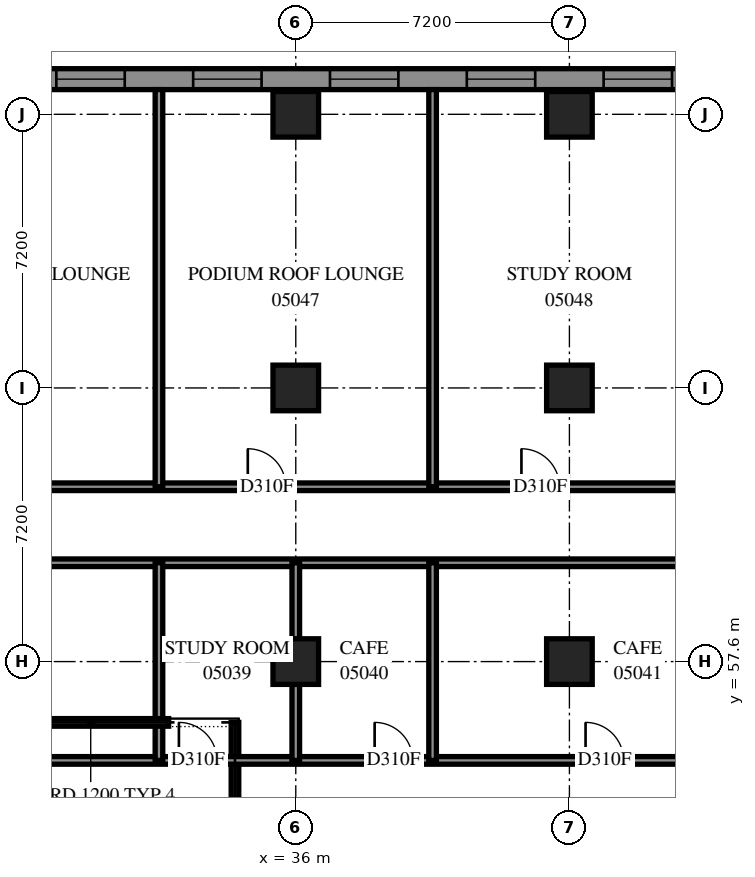
"""IFC4 building model, lengths in metres.
Left out: names, types, materials, properties, quantities, classifications, styles, units other than length and angle.
Written with IfcOpenShell. Run it as: python <this file> out.ifc"""

import sys

from ifc_helpers import new_model, si_unit, direction, frame, frame_2d, origin, origin_2d, place, context, subcontext, project, spatial, polyline, rectangle, outline, extrude, element, fill, save


model = new_model("IFC4")
c1 = context("Model", 3, precision=1e-05, world=origin(), true_north=direction((0.0, 1.0)))
c2 = subcontext(c1, "Body", "Model", "MODEL_VIEW")
j1 = project(units=[si_unit("LENGTHUNIT", "METRE"), si_unit("PLANEANGLEUNIT", "RADIAN")], contexts=[c1])
p1 = place(None, origin())
s1 = spatial("IfcSite", under=j1, at=p1, CompositionType="ELEMENT")
p2 = place(p1, origin())
s2 = spatial("IfcBuilding", under=s1, at=p2, CompositionType="ELEMENT")
p3 = place(p2, frame((0.0, 0.0, 22.8)))
s3 = spatial("IfcBuildingStorey", under=s2, at=p3, CompositionType="ELEMENT", Elevation=22.8)
for number, where, z_axis, x_axis in (
    (1, (36.0, 57.6, 0.0), (0.0, 0.0, 1.0), (1.0, 0.0, 0.0)),
    (2, (36.0, 64.8, 0.0), (0.0, 0.0, 1.0), (1.0, 0.0, 0.0)),
    (3, (36.0, 72.0, 0.0), (0.0, 0.0, 1.0), (1.0, 0.0, 0.0)),
    (4, (43.2, 57.6, 0.0), (0.0, 0.0, 1.0), (1.0, 0.0, 0.0)),
    (5, (43.2, 64.8, 0.0), (0.0, 0.0, 1.0), (1.0, 0.0, 0.0)),
    (6, (43.2, 72.0, 0.0), (0.0, 0.0, 1.0), (1.0, 0.0, 0.0)),
):
    element("IfcColumn", number, at=place(p3, frame(where, z_axis=z_axis, x_axis=x_axis)), inside=s3, PredefinedType="COLUMN", context=c2, shape_type="SweptSolid", body=[
        extrude(rectangle(XDim=1.2, YDim=1.2, at=origin_2d()), origin(), (0.0, 0.0, 1.0), 3.9),
    ])
p4 = place(p3, frame((79.583, 72.925, 0.0), z_axis=(0.0, 0.0, 1.0), x_axis=(-1.0, 0.0, 0.0)))
e7 = element("IfcWall", 7, at=p4, inside=s3, PredefinedType="SOLIDWALL", context=c2, shape_type="SweptSolid", body=[
    extrude(outline(polyline([(-0.114, -0.275), (79.583, -0.275), (79.033, 0.275), (0.114, 0.275), (-0.114, -0.275)])), origin(), (0.0, 0.0, 1.0), 3.9),
])
p5 = place(p4, frame((1.249, 0.0, 0.7)))
e8 = element("IfcOpeningElement", 8, at=p5, cuts=e7, PredefinedType="OPENING", context=c2, shape_type="SweptSolid", body=[
    extrude(rectangle(XDim=1.8, YDim=2.4, at=frame_2d((0.9, 1.2))), frame((0.0, 0.285, 0.0), z_axis=(0.0, -1.0, 0.0), x_axis=(1.0, 0.0, 0.0)), (0.0, 0.0, 1.0), 0.57),
])
p6 = place(p4, frame((4.883, 0.0, 0.7)))
e9 = element("IfcOpeningElement", 9, at=p6, cuts=e7, PredefinedType="OPENING", context=c2, shape_type="SweptSolid", body=[
    extrude(rectangle(XDim=1.8, YDim=2.4, at=frame_2d((0.9, 1.2))), frame((0.0, 0.285, 0.0), z_axis=(0.0, -1.0, 0.0), x_axis=(1.0, 0.0, 0.0)), (0.0, 0.0, 1.0), 0.57),
])
p7 = place(p4, frame((8.483, 0.0, 0.7)))
e10 = element("IfcOpeningElement", 10, at=p7, cuts=e7, PredefinedType="OPENING", context=c2, shape_type="SweptSolid", body=[
    extrude(rectangle(XDim=1.8, YDim=2.4, at=frame_2d((0.9, 1.2))), frame((0.0, 0.285, 0.0), z_axis=(0.0, -1.0, 0.0), x_axis=(1.0, 0.0, 0.0)), (0.0, 0.0, 1.0), 0.57),
])
p8 = place(p4, frame((12.083, 0.0, 0.7)))
e11 = element("IfcOpeningElement", 11, at=p8, cuts=e7, PredefinedType="OPENING", context=c2, shape_type="SweptSolid", body=[
    extrude(rectangle(XDim=1.8, YDim=2.4, at=frame_2d((0.9, 1.2))), frame((0.0, 0.285, 0.0), z_axis=(0.0, -1.0, 0.0), x_axis=(1.0, 0.0, 0.0)), (0.0, 0.0, 1.0), 0.57),
])
p9 = place(p4, frame((15.683, 0.0, 0.7)))
e12 = element("IfcOpeningElement", 12, at=p9, cuts=e7, PredefinedType="OPENING", context=c2, shape_type="SweptSolid", body=[
    extrude(rectangle(XDim=1.8, YDim=2.4, at=frame_2d((0.9, 1.2))), frame((0.0, 0.285, 0.0), z_axis=(0.0, -1.0, 0.0), x_axis=(1.0, 0.0, 0.0)), (0.0, 0.0, 1.0), 0.57),
])
p10 = place(p4, frame((19.283, 0.0, 0.7)))
e13 = element("IfcOpeningElement", 13, at=p10, cuts=e7, PredefinedType="OPENING", context=c2, shape_type="SweptSolid", body=[
    extrude(rectangle(XDim=1.8, YDim=2.4, at=frame_2d((0.9, 1.2))), frame((0.0, 0.285, 0.0), z_axis=(0.0, -1.0, 0.0), x_axis=(1.0, 0.0, 0.0)), (0.0, 0.0, 1.0), 0.57),
])
p11 = place(p4, frame((22.883, 0.0, 0.7)))
e14 = element("IfcOpeningElement", 14, at=p11, cuts=e7, PredefinedType="OPENING", context=c2, shape_type="SweptSolid", body=[
    extrude(rectangle(XDim=1.8, YDim=2.4, at=frame_2d((0.9, 1.2))), frame((0.0, 0.285, 0.0), z_axis=(0.0, -1.0, 0.0), x_axis=(1.0, 0.0, 0.0)), (0.0, 0.0, 1.0), 0.57),
])
p12 = place(p4, frame((26.483, 0.0, 0.7)))
e15 = element("IfcOpeningElement", 15, at=p12, cuts=e7, PredefinedType="OPENING", context=c2, shape_type="SweptSolid", body=[
    extrude(rectangle(XDim=1.8, YDim=2.4, at=frame_2d((0.9, 1.2))), frame((0.0, 0.285, 0.0), z_axis=(0.0, -1.0, 0.0), x_axis=(1.0, 0.0, 0.0)), (0.0, 0.0, 1.0), 0.57),
])
p13 = place(p4, frame((30.083, 0.0, 0.7)))
e16 = element("IfcOpeningElement", 16, at=p13, cuts=e7, PredefinedType="OPENING", context=c2, shape_type="SweptSolid", body=[
    extrude(rectangle(XDim=1.8, YDim=2.4, at=frame_2d((0.9, 1.2))), frame((0.0, 0.285, 0.0), z_axis=(0.0, -1.0, 0.0), x_axis=(1.0, 0.0, 0.0)), (0.0, 0.0, 1.0), 0.57),
])
p14 = place(p4, frame((33.683, 0.0, 0.7)))
e17 = element("IfcOpeningElement", 17, at=p14, cuts=e7, PredefinedType="OPENING", context=c2, shape_type="SweptSolid", body=[
    extrude(rectangle(XDim=1.8, YDim=2.4, at=frame_2d((0.9, 1.2))), frame((0.0, 0.285, 0.0), z_axis=(0.0, -1.0, 0.0), x_axis=(1.0, 0.0, 0.0)), (0.0, 0.0, 1.0), 0.57),
])
p15 = place(p4, frame((37.283, 0.0, 0.7)))
e18 = element("IfcOpeningElement", 18, at=p15, cuts=e7, PredefinedType="OPENING", context=c2, shape_type="SweptSolid", body=[
    extrude(rectangle(XDim=1.8, YDim=2.4, at=frame_2d((0.9, 1.2))), frame((0.0, 0.285, 0.0), z_axis=(0.0, -1.0, 0.0), x_axis=(1.0, 0.0, 0.0)), (0.0, 0.0, 1.0), 0.57),
])
p16 = place(p4, frame((40.883, 0.0, 0.7)))
e19 = element("IfcOpeningElement", 19, at=p16, cuts=e7, PredefinedType="OPENING", context=c2, shape_type="SweptSolid", body=[
    extrude(rectangle(XDim=1.8, YDim=2.4, at=frame_2d((0.9, 1.2))), frame((0.0, 0.285, 0.0), z_axis=(0.0, -1.0, 0.0), x_axis=(1.0, 0.0, 0.0)), (0.0, 0.0, 1.0), 0.57),
])
p17 = place(p4, frame((44.483, 0.0, 0.7)))
e20 = element("IfcOpeningElement", 20, at=p17, cuts=e7, PredefinedType="OPENING", context=c2, shape_type="SweptSolid", body=[
    extrude(rectangle(XDim=1.8, YDim=2.4, at=frame_2d((0.9, 1.2))), frame((0.0, 0.285, 0.0), z_axis=(0.0, -1.0, 0.0), x_axis=(1.0, 0.0, 0.0)), (0.0, 0.0, 1.0), 0.57),
])
p18 = place(p4, frame((48.083, 0.0, 0.7)))
e21 = element("IfcOpeningElement", 21, at=p18, cuts=e7, PredefinedType="OPENING", context=c2, shape_type="SweptSolid", body=[
    extrude(rectangle(XDim=1.8, YDim=2.4, at=frame_2d((0.9, 1.2))), frame((0.0, 0.285, 0.0), z_axis=(0.0, -1.0, 0.0), x_axis=(1.0, 0.0, 0.0)), (0.0, 0.0, 1.0), 0.57),
])
p19 = place(p4, frame((51.683, 0.0, 0.7)))
e22 = element("IfcOpeningElement", 22, at=p19, cuts=e7, PredefinedType="OPENING", context=c2, shape_type="SweptSolid", body=[
    extrude(rectangle(XDim=1.8, YDim=2.4, at=frame_2d((0.9, 1.2))), frame((0.0, 0.285, 0.0), z_axis=(0.0, -1.0, 0.0), x_axis=(1.0, 0.0, 0.0)), (0.0, 0.0, 1.0), 0.57),
])
p20 = place(p4, frame((55.283, 0.0, 0.7)))
e23 = element("IfcOpeningElement", 23, at=p20, cuts=e7, PredefinedType="OPENING", context=c2, shape_type="SweptSolid", body=[
    extrude(rectangle(XDim=1.8, YDim=2.4, at=frame_2d((0.9, 1.2))), frame((0.0, 0.285, 0.0), z_axis=(0.0, -1.0, 0.0), x_axis=(1.0, 0.0, 0.0)), (0.0, 0.0, 1.0), 0.57),
])
p21 = place(p4, frame((58.883, 0.0, 0.7)))
e24 = element("IfcOpeningElement", 24, at=p21, cuts=e7, PredefinedType="OPENING", context=c2, shape_type="SweptSolid", body=[
    extrude(rectangle(XDim=1.8, YDim=2.4, at=frame_2d((0.9, 1.2))), frame((0.0, 0.285, 0.0), z_axis=(0.0, -1.0, 0.0), x_axis=(1.0, 0.0, 0.0)), (0.0, 0.0, 1.0), 0.57),
])
p22 = place(p4, frame((62.483, 0.0, 0.7)))
e25 = element("IfcOpeningElement", 25, at=p22, cuts=e7, PredefinedType="OPENING", context=c2, shape_type="SweptSolid", body=[
    extrude(rectangle(XDim=1.8, YDim=2.4, at=frame_2d((0.9, 1.2))), frame((0.0, 0.285, 0.0), z_axis=(0.0, -1.0, 0.0), x_axis=(1.0, 0.0, 0.0)), (0.0, 0.0, 1.0), 0.57),
])
p23 = place(p4, frame((66.083, 0.0, 0.7)))
e26 = element("IfcOpeningElement", 26, at=p23, cuts=e7, PredefinedType="OPENING", context=c2, shape_type="SweptSolid", body=[
    extrude(rectangle(XDim=1.8, YDim=2.4, at=frame_2d((0.9, 1.2))), frame((0.0, 0.285, 0.0), z_axis=(0.0, -1.0, 0.0), x_axis=(1.0, 0.0, 0.0)), (0.0, 0.0, 1.0), 0.57),
])
p24 = place(p4, frame((69.683, 0.0, 0.7)))
e27 = element("IfcOpeningElement", 27, at=p24, cuts=e7, PredefinedType="OPENING", context=c2, shape_type="SweptSolid", body=[
    extrude(rectangle(XDim=1.8, YDim=2.4, at=frame_2d((0.9, 1.2))), frame((0.0, 0.285, 0.0), z_axis=(0.0, -1.0, 0.0), x_axis=(1.0, 0.0, 0.0)), (0.0, 0.0, 1.0), 0.57),
])
p25 = place(p4, frame((73.683, 0.0, 0.7)))
e28 = element("IfcOpeningElement", 28, at=p25, cuts=e7, PredefinedType="OPENING", context=c2, shape_type="SweptSolid", body=[
    extrude(rectangle(XDim=1.8, YDim=2.4, at=frame_2d((0.9, 1.2))), frame((0.0, 0.285, 0.0), z_axis=(0.0, -1.0, 0.0), x_axis=(1.0, 0.0, 0.0)), (0.0, 0.0, 1.0), 0.57),
])
p26 = place(p4, frame((76.508, 0.0, 0.7)))
e29 = element("IfcOpeningElement", 29, at=p26, cuts=e7, PredefinedType="OPENING", context=c2, shape_type="SweptSolid", body=[
    extrude(rectangle(XDim=1.8, YDim=2.4, at=frame_2d((0.9, 1.2))), frame((0.0, 0.285, 0.0), z_axis=(0.0, -1.0, 0.0), x_axis=(1.0, 0.0, 0.0)), (0.0, 0.0, 1.0), 0.57),
])
p27 = place(p3, frame((34.4, 47.9, 0.0), z_axis=(0.0, 0.0, 1.0), x_axis=(0.0, 1.0, 0.0)))
e30 = element("IfcWall", 30, at=p27, inside=s3, PredefinedType="PARAPET", context=c2, shape_type="SweptSolid", body=[
    extrude(outline(polyline([(0.1, -0.1), (8.2, -0.1), (8.0, 0.1), (-0.1, 0.1), (0.1, -0.1)])), origin(), (0.0, 0.0, 1.0), 0.25),
])
p28 = place(p3, frame((0.0, 55.0, 0.0), z_axis=(0.0, 0.0, 1.0), x_axis=(1.0, 0.0, 0.0)))
e31 = element("IfcWall", 31, at=p28, inside=s3, PredefinedType="PARTITIONING", context=c2, shape_type="SweptSolid", body=[
    extrude(rectangle(XDim=54.6, YDim=0.2, at=frame_2d((27.3, 0.0))), origin(), (0.0, 0.0, 1.0), 3.9),
])
p29 = place(p28, frame((8.689, 0.0, 0.0)))
e32 = element("IfcOpeningElement", 32, at=p29, cuts=e31, PredefinedType="OPENING", context=c2, shape_type="SweptSolid", body=[
    extrude(rectangle(XDim=1.0, YDim=2.1, at=frame_2d((0.5, 1.05))), frame((0.0, 0.11, 0.0), z_axis=(0.0, -1.0, 0.0), x_axis=(1.0, 0.0, 0.0)), (0.0, 0.0, 1.0), 0.22),
])
p30 = place(p28, frame((14.825, 0.0, 0.0)))
e33 = element("IfcOpeningElement", 33, at=p30, cuts=e31, PredefinedType="OPENING", context=c2, shape_type="SweptSolid", body=[
    extrude(rectangle(XDim=1.0, YDim=2.1, at=frame_2d((0.5, 1.05))), frame((0.0, 0.11, 0.0), z_axis=(0.0, -1.0, 0.0), x_axis=(1.0, 0.0, 0.0)), (0.0, 0.0, 1.0), 0.22),
])
p31 = place(p28, frame((27.284, 0.0, 0.0)))
e34 = element("IfcOpeningElement", 34, at=p31, cuts=e31, PredefinedType="OPENING", context=c2, shape_type="SweptSolid", body=[
    extrude(rectangle(XDim=1.0, YDim=2.1, at=frame_2d((0.5, 1.05))), frame((0.0, 0.11, 0.0), z_axis=(0.0, -1.0, 0.0), x_axis=(1.0, 0.0, 0.0)), (0.0, 0.0, 1.0), 0.22),
])
p32 = place(p28, frame((32.925, 0.0, 0.0)))
e35 = element("IfcOpeningElement", 35, at=p32, cuts=e31, PredefinedType="OPENING", context=c2, shape_type="SweptSolid", body=[
    extrude(rectangle(XDim=1.0, YDim=2.1, at=frame_2d((0.5, 1.05))), frame((0.0, 0.11, 0.0), z_axis=(0.0, -1.0, 0.0), x_axis=(1.0, 0.0, 0.0)), (0.0, 0.0, 1.0), 0.22),
])
p33 = place(p28, frame((38.075, 0.0, 0.0)))
e36 = element("IfcOpeningElement", 36, at=p33, cuts=e31, PredefinedType="OPENING", context=c2, shape_type="SweptSolid", body=[
    extrude(rectangle(XDim=1.0, YDim=2.1, at=frame_2d((0.5, 1.05))), frame((0.0, 0.11, 0.0), z_axis=(0.0, -1.0, 0.0), x_axis=(1.0, 0.0, 0.0)), (0.0, 0.0, 1.0), 0.22),
])
p34 = place(p28, frame((43.625, 0.0, 0.0)))
e37 = element("IfcOpeningElement", 37, at=p34, cuts=e31, PredefinedType="OPENING", context=c2, shape_type="SweptSolid", body=[
    extrude(rectangle(XDim=1.0, YDim=2.1, at=frame_2d((0.5, 1.05))), frame((0.0, 0.11, 0.0), z_axis=(0.0, -1.0, 0.0), x_axis=(1.0, 0.0, 0.0)), (0.0, 0.0, 1.0), 0.22),
])
p35 = place(p28, frame((52.752, 0.0, 0.0)))
e38 = element("IfcOpeningElement", 38, at=p35, cuts=e31, PredefinedType="OPENING", context=c2, shape_type="SweptSolid", body=[
    extrude(rectangle(XDim=1.0, YDim=2.1, at=frame_2d((0.5, 1.05))), frame((0.0, 0.11, 0.0), z_axis=(0.0, -1.0, 0.0), x_axis=(1.0, 0.0, 0.0)), (0.0, 0.0, 1.0), 0.22),
])
p36 = place(p28, frame((2.332, 0.0, 0.0)))
e39 = element("IfcOpeningElement", 39, at=p36, cuts=e31, PredefinedType="OPENING", context=c2, shape_type="SweptSolid", body=[
    extrude(rectangle(XDim=1.0, YDim=2.1, at=frame_2d((0.5, 1.05))), frame((0.0, 0.11, 0.0), z_axis=(0.0, -1.0, 0.0), x_axis=(1.0, 0.0, 0.0)), (0.0, 0.0, 1.0), 0.22),
])
p37 = place(p3, frame((0.002, 60.2, 0.0), z_axis=(0.0, 0.0, 1.0), x_axis=(1.0, 0.0, 0.0)))
e40 = element("IfcWall", 40, at=p37, inside=s3, PredefinedType="PARTITIONING", context=c2, shape_type="SweptSolid", body=[
    extrude(rectangle(XDim=54.598, YDim=0.2, at=frame_2d((27.299, 0.0))), origin(), (0.0, 0.0, 1.0), 3.9),
])
p38 = place(p37, frame((3.863, 0.0, 0.0)))
e41 = element("IfcOpeningElement", 41, at=p38, cuts=e40, PredefinedType="OPENING", context=c2, shape_type="SweptSolid", body=[
    extrude(rectangle(XDim=1.0, YDim=2.1, at=frame_2d((0.5, 1.05))), frame((0.0, 0.11, 0.0), z_axis=(0.0, -1.0, 0.0), x_axis=(1.0, 0.0, 0.0)), (0.0, 0.0, 1.0), 0.22),
])
p39 = place(p3, frame((0.002, 62.2, 0.0), z_axis=(0.0, 0.0, 1.0), x_axis=(1.0, 0.0, 0.0)))
e42 = element("IfcWall", 42, at=p39, inside=s3, PredefinedType="PARTITIONING", context=c2, shape_type="SweptSolid", body=[
    extrude(rectangle(XDim=54.598, YDim=0.2, at=frame_2d((27.299, 0.0))), origin(), (0.0, 0.0, 1.0), 3.9),
])
p40 = place(p39, frame((8.667, 0.0, 0.0)))
e43 = element("IfcOpeningElement", 43, at=p40, cuts=e42, PredefinedType="OPENING", context=c2, shape_type="SweptSolid", body=[
    extrude(rectangle(XDim=1.0, YDim=2.1, at=frame_2d((0.5, 1.05))), frame((0.0, 0.11, 0.0), z_axis=(0.0, -1.0, 0.0), x_axis=(1.0, 0.0, 0.0)), (0.0, 0.0, 1.0), 0.22),
])
p41 = place(p39, frame((13.136, 0.0, 0.0)))
e44 = element("IfcOpeningElement", 44, at=p41, cuts=e42, PredefinedType="OPENING", context=c2, shape_type="SweptSolid", body=[
    extrude(rectangle(XDim=1.0, YDim=2.1, at=frame_2d((0.5, 1.05))), frame((0.0, 0.11, 0.0), z_axis=(0.0, -1.0, 0.0), x_axis=(1.0, 0.0, 0.0)), (0.0, 0.0, 1.0), 0.22),
])
p42 = place(p39, frame((20.335, 0.0, 0.0)))
e45 = element("IfcOpeningElement", 45, at=p42, cuts=e42, PredefinedType="OPENING", context=c2, shape_type="SweptSolid", body=[
    extrude(rectangle(XDim=1.0, YDim=2.1, at=frame_2d((0.5, 1.05))), frame((0.0, 0.11, 0.0), z_axis=(0.0, -1.0, 0.0), x_axis=(1.0, 0.0, 0.0)), (0.0, 0.0, 1.0), 0.22),
])
p43 = place(p39, frame((27.535, 0.0, 0.0)))
e46 = element("IfcOpeningElement", 46, at=p43, cuts=e42, PredefinedType="OPENING", context=c2, shape_type="SweptSolid", body=[
    extrude(rectangle(XDim=1.0, YDim=2.1, at=frame_2d((0.5, 1.05))), frame((0.0, 0.11, 0.0), z_axis=(0.0, -1.0, 0.0), x_axis=(1.0, 0.0, 0.0)), (0.0, 0.0, 1.0), 0.22),
])
p44 = place(p39, frame((34.736, 0.0, 0.0)))
e47 = element("IfcOpeningElement", 47, at=p44, cuts=e42, PredefinedType="OPENING", context=c2, shape_type="SweptSolid", body=[
    extrude(rectangle(XDim=1.0, YDim=2.1, at=frame_2d((0.5, 1.05))), frame((0.0, 0.11, 0.0), z_axis=(0.0, -1.0, 0.0), x_axis=(1.0, 0.0, 0.0)), (0.0, 0.0, 1.0), 0.22),
])
p45 = place(p39, frame((41.935, 0.0, 0.0)))
e48 = element("IfcOpeningElement", 48, at=p45, cuts=e42, PredefinedType="OPENING", context=c2, shape_type="SweptSolid", body=[
    extrude(rectangle(XDim=1.0, YDim=2.1, at=frame_2d((0.5, 1.05))), frame((0.0, 0.11, 0.0), z_axis=(0.0, -1.0, 0.0), x_axis=(1.0, 0.0, 0.0)), (0.0, 0.0, 1.0), 0.22),
])
p46 = place(p39, frame((49.136, 0.0, 0.0)))
e49 = element("IfcOpeningElement", 49, at=p46, cuts=e42, PredefinedType="OPENING", context=c2, shape_type="SweptSolid", body=[
    extrude(rectangle(XDim=1.0, YDim=2.1, at=frame_2d((0.5, 1.05))), frame((0.0, 0.11, 0.0), z_axis=(0.0, -1.0, 0.0), x_axis=(1.0, 0.0, 0.0)), (0.0, 0.0, 1.0), 0.22),
])
p47 = place(p39, frame((4.803, 0.0, 0.0)))
e50 = element("IfcOpeningElement", 50, at=p47, cuts=e42, PredefinedType="OPENING", context=c2, shape_type="SweptSolid", body=[
    extrude(rectangle(XDim=1.0, YDim=2.1, at=frame_2d((0.5, 1.05))), frame((0.0, 0.11, 0.0), z_axis=(0.0, -1.0, 0.0), x_axis=(1.0, 0.0, 0.0)), (0.0, 0.0, 1.0), 0.22),
])
for number, where, z_axis, x_axis in (
    (51, (32.4, 62.2, 0.0), (0.0, 0.0, 1.0), (0.0, 1.0, 0.0)),
    (52, (39.6, 62.2, 0.0), (0.0, 0.0, 1.0), (0.0, 1.0, 0.0)),
):
    element("IfcWall", number, at=place(p3, frame(where, z_axis=z_axis, x_axis=x_axis)), inside=s3, PredefinedType="PARTITIONING", context=c2, shape_type="SweptSolid", body=[
        extrude(rectangle(XDim=10.45, YDim=0.2, at=frame_2d((5.225, 0.0))), origin(), (0.0, 0.0, 1.0), 3.9),
    ])
for number, where, z_axis, x_axis in (
    (53, (32.4, 55.0, 0.0), (0.0, 0.0, 1.0), (0.0, 1.0, 0.0)),
    (54, (39.6, 55.0, 0.0), (0.0, 0.0, 1.0), (0.0, 1.0, 0.0)),
):
    element("IfcWall", number, at=place(p3, frame(where, z_axis=z_axis, x_axis=x_axis)), inside=s3, PredefinedType="PARTITIONING", context=c2, shape_type="SweptSolid", body=[
        extrude(rectangle(XDim=5.2, YDim=0.2, at=frame_2d((2.6, 0.0))), origin(), (0.0, 0.0, 1.0), 3.9),
    ])
p48 = place(p3, frame((36.0, 55.0, 0.0), z_axis=(0.0, 0.0, 1.0), x_axis=(0.0, 1.0, 0.0)))
e55 = element("IfcWall", 55, at=p48, inside=s3, PredefinedType="PARTITIONING", context=c2, shape_type="SweptSolid", body=[
    extrude(rectangle(XDim=2.0, YDim=0.2, at=frame_2d((1.0, 0.0))), origin(), (0.0, 0.0, 1.0), 3.4),
])
p49 = place(p3, frame((36.0, 58.2, 0.0), z_axis=(0.0, 0.0, 1.0), x_axis=(0.0, 1.0, 0.0)))
e56 = element("IfcWall", 56, at=p49, inside=s3, PredefinedType="PARTITIONING", context=c2, shape_type="SweptSolid", body=[
    extrude(rectangle(XDim=2.0, YDim=0.2, at=frame_2d((1.0, 0.0))), origin(), (0.0, 0.0, 1.0), 3.9),
])
p50 = place(p3, frame((32.655, 56.0, 0.0), z_axis=(0.0, 0.0, 1.0), x_axis=(-1.0, 0.0, 0.0)))
e57 = element("IfcWall", 57, at=p50, inside=s3, PredefinedType="PARAPET", context=c2, shape_type="SweptSolid", body=[
    extrude(outline(polyline([(0.0, -0.1), (4.101, -0.1), (4.101, 0.1), (0.0, 0.1), (0.0, -0.1)])), origin(), (0.0, 0.0, 1.0), 0.25),
])
p51 = place(p14, origin())
e58 = element("IfcWindow", 58, at=p51, inside=s3, PartitioningType="SINGLE_PANEL", PredefinedType="WINDOW", context=c2, shape_type="SweptSolid", body=[
    extrude(rectangle(XDim=1.8, YDim=2.4, at=frame_2d((0.9, 1.2))), frame((0.0, 0.155, 0.0), z_axis=(0.0, -1.0, 0.0), x_axis=(1.0, 0.0, 0.0)), (0.0, 0.0, 1.0), 0.06),
])
fill(e17, e58)
p52 = place(p15, origin())
e59 = element("IfcWindow", 59, at=p52, inside=s3, PartitioningType="SINGLE_PANEL", PredefinedType="WINDOW", context=c2, shape_type="SweptSolid", body=[
    extrude(rectangle(XDim=1.8, YDim=2.4, at=frame_2d((0.9, 1.2))), frame((0.0, 0.155, 0.0), z_axis=(0.0, -1.0, 0.0), x_axis=(1.0, 0.0, 0.0)), (0.0, 0.0, 1.0), 0.06),
])
fill(e18, e59)
p53 = place(p16, origin())
e60 = element("IfcWindow", 60, at=p53, inside=s3, PartitioningType="SINGLE_PANEL", PredefinedType="WINDOW", context=c2, shape_type="SweptSolid", body=[
    extrude(rectangle(XDim=1.8, YDim=2.4, at=frame_2d((0.9, 1.2))), frame((0.0, 0.155, 0.0), z_axis=(0.0, -1.0, 0.0), x_axis=(1.0, 0.0, 0.0)), (0.0, 0.0, 1.0), 0.06),
])
fill(e19, e60)
p54 = place(p17, origin())
e61 = element("IfcWindow", 61, at=p54, inside=s3, PartitioningType="SINGLE_PANEL", PredefinedType="WINDOW", context=c2, shape_type="SweptSolid", body=[
    extrude(rectangle(XDim=1.8, YDim=2.4, at=frame_2d((0.9, 1.2))), frame((0.0, 0.155, 0.0), z_axis=(0.0, -1.0, 0.0), x_axis=(1.0, 0.0, 0.0)), (0.0, 0.0, 1.0), 0.06),
])
fill(e20, e61)
p55 = place(p18, origin())
e62 = element("IfcWindow", 62, at=p55, inside=s3, PartitioningType="SINGLE_PANEL", PredefinedType="WINDOW", context=c2, shape_type="SweptSolid", body=[
    extrude(rectangle(XDim=1.8, YDim=2.4, at=frame_2d((0.9, 1.2))), frame((0.0, 0.155, 0.0), z_axis=(0.0, -1.0, 0.0), x_axis=(1.0, 0.0, 0.0)), (0.0, 0.0, 1.0), 0.06),
])
fill(e21, e62)
p56 = place(p32, origin())
e63 = element("IfcDoor", 63, at=p56, inside=s3, OperationType="SINGLE_SWING_LEFT", PredefinedType="DOOR", context=c2, shape_type="SweptSolid", body=[
    extrude(rectangle(XDim=1.0, YDim=2.1, at=frame_2d((0.5, 1.05))), frame((0.0, 0.025, 0.0), z_axis=(0.0, -1.0, 0.0), x_axis=(1.0, 0.0, 0.0)), (0.0, 0.0, 1.0), 0.05),
])
fill(e35, e63)
p57 = place(p33, origin())
e64 = element("IfcDoor", 64, at=p57, inside=s3, OperationType="SINGLE_SWING_RIGHT", PredefinedType="DOOR", context=c2, shape_type="SweptSolid", body=[
    extrude(rectangle(XDim=1.0, YDim=2.1, at=frame_2d((0.5, 1.05))), frame((0.0, 0.025, 0.0), z_axis=(0.0, -1.0, 0.0), x_axis=(1.0, 0.0, 0.0)), (0.0, 0.0, 1.0), 0.05),
])
fill(e36, e64)
p58 = place(p34, origin())
e65 = element("IfcDoor", 65, at=p58, inside=s3, OperationType="SINGLE_SWING_LEFT", PredefinedType="DOOR", context=c2, shape_type="SweptSolid", body=[
    extrude(rectangle(XDim=1.0, YDim=2.1, at=frame_2d((0.5, 1.05))), frame((0.0, 0.025, 0.0), z_axis=(0.0, -1.0, 0.0), x_axis=(1.0, 0.0, 0.0)), (0.0, 0.0, 1.0), 0.05),
])
fill(e37, e65)
p59 = place(p44, origin())
e66 = element("IfcDoor", 66, at=p59, inside=s3, OperationType="SINGLE_SWING_LEFT", PredefinedType="DOOR", context=c2, shape_type="SweptSolid", body=[
    extrude(rectangle(XDim=1.0, YDim=2.1, at=frame_2d((0.5, 1.05))), frame((0.0, 0.025, 0.0), z_axis=(0.0, -1.0, 0.0), x_axis=(1.0, 0.0, 0.0)), (0.0, 0.0, 1.0), 0.05),
])
fill(e47, e66)
p60 = place(p45, origin())
e67 = element("IfcDoor", 67, at=p60, inside=s3, OperationType="SINGLE_SWING_LEFT", PredefinedType="DOOR", context=c2, shape_type="SweptSolid", body=[
    extrude(rectangle(XDim=1.0, YDim=2.1, at=frame_2d((0.5, 1.05))), frame((0.0, 0.025, 0.0), z_axis=(0.0, -1.0, 0.0), x_axis=(1.0, 0.0, 0.0)), (0.0, 0.0, 1.0), 0.05),
])
fill(e48, e67)
save(model, sys.argv[1])
